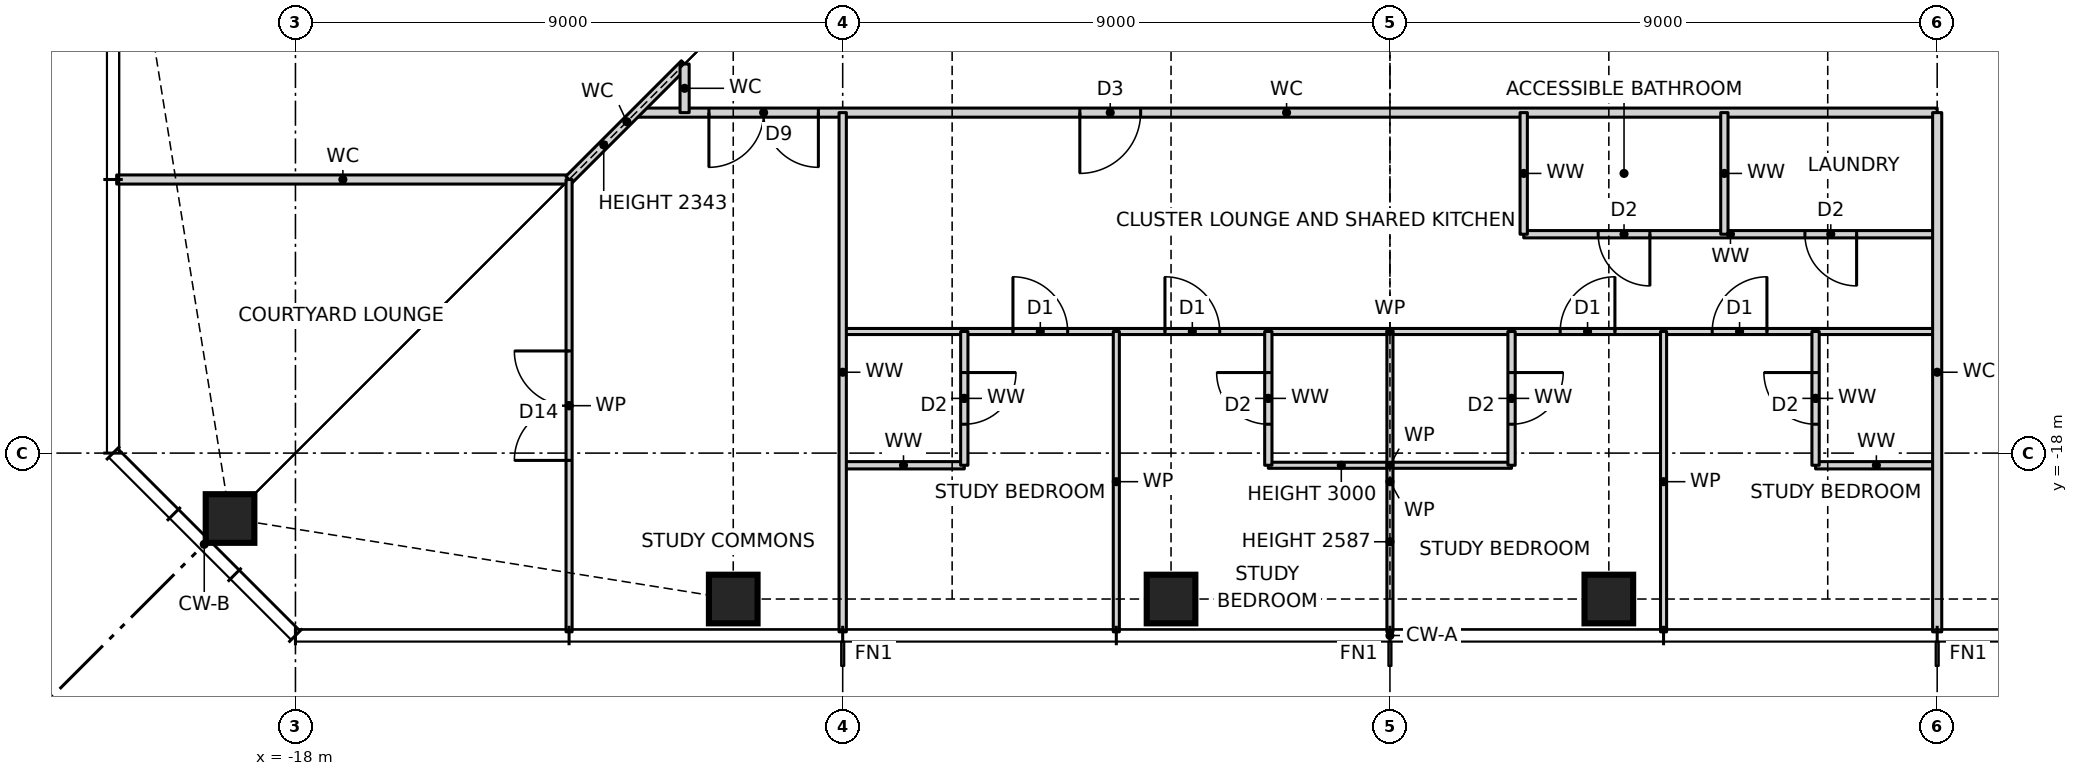
"""IFC4 building model, lengths in metres.
Left out: names, types, materials, properties, quantities, classifications, styles, units other than length and angle.
Written with IfcOpenShell. Run it as: python <this file> out.ifc"""

import sys

from ifc_helpers import new_model, si_unit, direction, frame, frame_2d, origin, origin_2d, place, context, subcontext, project, spatial, rectangle, hollow_rectangle, extrude, element, fill, save


model = new_model("IFC4")
c1 = context("Model", 3, precision=1e-05, world=origin(), true_north=direction((0.0, 1.0)))
c2 = subcontext(c1, "Body", "Model", "MODEL_VIEW")
j1 = project(units=[si_unit("LENGTHUNIT", "METRE"), si_unit("PLANEANGLEUNIT", "RADIAN")], contexts=[c1])
p1 = place(None, origin())
s1 = spatial("IfcSite", under=j1, at=p1, CompositionType="ELEMENT")
p2 = place(p1, origin())
s2 = spatial("IfcBuilding", under=s1, at=p2, CompositionType="ELEMENT")
p3 = place(p2, frame((0.0, 0.0, 87.5)))
s3 = spatial("IfcBuildingStorey", under=s2, at=p3, CompositionType="ELEMENT", Elevation=87.5)
for number, where, z_axis, x_axis in (
    (1, (-19.076, -19.076, 0.0), (0.0, 0.0, 1.0), (1.0, 0.0, 0.0)),
    (2, (-10.8, -20.4, 0.0), (0.0, 0.0, 1.0), (1.0, 0.0, 0.0)),
    (3, (-3.6, -20.4, 0.0), (0.0, 0.0, 1.0), (1.0, 0.0, 0.0)),
    (4, (3.6, -20.4, 0.0), (0.0, 0.0, 1.0), (1.0, 0.0, 0.0)),
):
    element("IfcColumn", number, at=place(p3, frame(where, z_axis=z_axis, x_axis=x_axis)), inside=s3, PredefinedType="COLUMN", context=c2, shape_type="SweptSolid", body=[
        extrude(hollow_rectangle(XDim=0.8, YDim=0.8, WallThickness=0.07, at=origin_2d()), origin(), (0.0, 0.0, 1.0), 3.5),
    ])
p4 = place(p3, frame((-9.0, -18.2, 0.0), z_axis=(0.0, 0.0, 1.0), x_axis=(1.0, 0.0, 0.0)))
e5 = element("IfcWall", 5, at=p4, inside=s3, PredefinedType="PARTITIONING", context=c2, shape_type="SweptSolid", body=[
    extrude(rectangle(XDim=2.0, YDim=0.12, at=frame_2d((1.0, 0.0))), origin(), (0.0, 0.0, 1.0), 3.27),
])
p5 = place(p3, frame((-2.0, -18.2, 0.0), z_axis=(0.0, 0.0, 1.0), x_axis=(1.0, 0.0, 0.0)))
e6 = element("IfcWall", 6, at=p5, inside=s3, PredefinedType="PARTITIONING", context=c2, shape_type="SweptSolid", body=[
    extrude(rectangle(XDim=4.0, YDim=0.1, at=frame_2d((2.0, 0.0))), origin(), (0.0, 0.0, 1.0), 3.0),
])
p6 = place(p3, frame((7.0, -18.2, 0.0), z_axis=(0.0, 0.0, 1.0), x_axis=(1.0, 0.0, 0.0)))
e7 = element("IfcWall", 7, at=p6, inside=s3, PredefinedType="PARTITIONING", context=c2, shape_type="SweptSolid", body=[
    extrude(rectangle(XDim=2.0, YDim=0.12, at=frame_2d((1.0, 0.0))), origin(), (0.0, 0.0, 1.0), 3.27),
])
p7 = place(p3, frame((-9.0, -16.0, 0.0), z_axis=(0.0, 0.0, 1.0), x_axis=(1.0, 0.0, 0.0)))
e8 = element("IfcWall", 8, at=p7, inside=s3, PredefinedType="PARTITIONING", context=c2, shape_type="SweptSolid", body=[
    extrude(rectangle(XDim=18.0, YDim=0.1, at=frame_2d((9.0, 0.0))), origin(), (0.0, 0.0, 1.0), 3.27),
])
p8 = place(p7, frame((2.8, 0.0, 0.0)))
e9 = element("IfcOpeningElement", 9, at=p8, cuts=e8, PredefinedType="OPENING", context=c2, shape_type="SweptSolid", body=[
    extrude(rectangle(XDim=0.9, YDim=2.1, at=frame_2d((0.45, 1.05))), frame((0.0, 0.06, 0.0), z_axis=(0.0, -1.0, 0.0), x_axis=(1.0, 0.0, 0.0)), (0.0, 0.0, 1.0), 0.12),
])
p9 = place(p7, frame((5.3, 0.0, 0.0)))
e10 = element("IfcOpeningElement", 10, at=p9, cuts=e8, PredefinedType="OPENING", context=c2, shape_type="SweptSolid", body=[
    extrude(rectangle(XDim=0.9, YDim=2.1, at=frame_2d((0.45, 1.05))), frame((0.0, 0.06, 0.0), z_axis=(0.0, -1.0, 0.0), x_axis=(1.0, 0.0, 0.0)), (0.0, 0.0, 1.0), 0.12),
])
p10 = place(p7, frame((11.8, 0.0, 0.0)))
e11 = element("IfcOpeningElement", 11, at=p10, cuts=e8, PredefinedType="OPENING", context=c2, shape_type="SweptSolid", body=[
    extrude(rectangle(XDim=0.9, YDim=2.1, at=frame_2d((0.45, 1.05))), frame((0.0, 0.06, 0.0), z_axis=(0.0, -1.0, 0.0), x_axis=(1.0, 0.0, 0.0)), (0.0, 0.0, 1.0), 0.12),
])
p11 = place(p7, frame((14.3, 0.0, 0.0)))
e12 = element("IfcOpeningElement", 12, at=p11, cuts=e8, PredefinedType="OPENING", context=c2, shape_type="SweptSolid", body=[
    extrude(rectangle(XDim=0.9, YDim=2.1, at=frame_2d((0.45, 1.05))), frame((0.0, 0.06, 0.0), z_axis=(0.0, -1.0, 0.0), x_axis=(1.0, 0.0, 0.0)), (0.0, 0.0, 1.0), 0.12),
])
p12 = place(p3, frame((2.2, -14.4, 0.0), z_axis=(0.0, 0.0, 1.0), x_axis=(1.0, 0.0, 0.0)))
e13 = element("IfcWall", 13, at=p12, inside=s3, PredefinedType="PARTITIONING", context=c2, shape_type="SweptSolid", body=[
    extrude(rectangle(XDim=6.8, YDim=0.12, at=frame_2d((3.4, 0.0))), origin(), (0.0, 0.0, 1.0), 3.27),
])
p13 = place(p12, frame((1.225, 0.0, 0.0)))
e14 = element("IfcOpeningElement", 14, at=p13, cuts=e13, PredefinedType="OPENING", context=c2, shape_type="SweptSolid", body=[
    extrude(rectangle(XDim=0.85, YDim=2.1, at=frame_2d((0.425, 1.05))), frame((0.0, 0.07, 0.0), z_axis=(0.0, -1.0, 0.0), x_axis=(1.0, 0.0, 0.0)), (0.0, 0.0, 1.0), 0.14),
])
p14 = place(p12, frame((4.625, 0.0, 0.0)))
e15 = element("IfcOpeningElement", 15, at=p14, cuts=e13, PredefinedType="OPENING", context=c2, shape_type="SweptSolid", body=[
    extrude(rectangle(XDim=0.85, YDim=2.1, at=frame_2d((0.425, 1.05))), frame((0.0, 0.07, 0.0), z_axis=(0.0, -1.0, 0.0), x_axis=(1.0, 0.0, 0.0)), (0.0, 0.0, 1.0), 0.14),
])
p15 = place(p3, frame((-20.94, -13.5, 0.0), z_axis=(0.0, 0.0, 1.0), x_axis=(1.0, 0.0, 0.0)))
e16 = element("IfcWall", 16, at=p15, inside=s3, PredefinedType="PARTITIONING", context=c2, shape_type="SweptSolid", body=[
    extrude(rectangle(XDim=7.44, YDim=0.15, at=frame_2d((3.72, 0.0))), origin(), (0.0, 0.0, 1.0), 3.27),
])
p16 = place(p3, frame((-12.4, -12.4, 0.0), z_axis=(0.0, 0.0, 1.0), x_axis=(1.0, 0.0, 0.0)))
e17 = element("IfcWall", 17, at=p16, inside=s3, PredefinedType="PARTITIONING", context=c2, shape_type="SweptSolid", body=[
    extrude(rectangle(XDim=21.4, YDim=0.15, at=frame_2d((10.7, 0.0))), origin(), (0.0, 0.0, 1.0), 3.27),
])
p17 = place(p16, frame((1.2, 0.0, 0.0)))
e18 = element("IfcOpeningElement", 18, at=p17, cuts=e17, PredefinedType="OPENING", context=c2, shape_type="SweptSolid", body=[
    extrude(rectangle(XDim=1.8, YDim=2.1, at=frame_2d((0.9, 1.05))), frame((0.0, 0.085, 0.0), z_axis=(0.0, -1.0, 0.0), x_axis=(1.0, 0.0, 0.0)), (0.0, 0.0, 1.0), 0.17),
])
p18 = place(p16, frame((7.3, 0.0, 0.0)))
e19 = element("IfcOpeningElement", 19, at=p18, cuts=e17, PredefinedType="OPENING", context=c2, shape_type="SweptSolid", body=[
    extrude(rectangle(XDim=1.0, YDim=2.1, at=frame_2d((0.5, 1.05))), frame((0.0, 0.085, 0.0), z_axis=(0.0, -1.0, 0.0), x_axis=(1.0, 0.0, 0.0)), (0.0, 0.0, 1.0), 0.17),
])
p19 = place(p3, frame((-13.5, -13.5, 0.0), z_axis=(0.0, 0.0, 1.0), x_axis=(0.707106781187, 0.707106781187, 0.0)))
e20 = element("IfcWall", 20, at=p19, inside=s3, PredefinedType="PARTITIONING", context=c2, shape_type="SweptSolid", body=[
    extrude(rectangle(XDim=2.687, YDim=0.15, at=frame_2d((1.343, 0.0))), origin(), (0.0, 0.0, 1.0), 2.343),
])
p20 = place(p3, frame((9.0, -20.94, 0.0), z_axis=(0.0, 0.0, 1.0), x_axis=(0.0, 1.0, 0.0)))
e21 = element("IfcWall", 21, at=p20, inside=s3, PredefinedType="PARTITIONING", context=c2, shape_type="SweptSolid", body=[
    extrude(rectangle(XDim=8.54, YDim=0.15, at=frame_2d((4.27, 0.0))), origin(), (0.0, 0.0, 1.0), 3.27),
])
p21 = place(p3, frame((7.0, -18.2, 0.0), z_axis=(0.0, 0.0, 1.0), x_axis=(0.0, 1.0, 0.0)))
e22 = element("IfcWall", 22, at=p21, inside=s3, PredefinedType="PARTITIONING", context=c2, shape_type="SweptSolid", body=[
    extrude(rectangle(XDim=2.2, YDim=0.12, at=frame_2d((1.1, 0.0))), origin(), (0.0, 0.0, 1.0), 3.27),
])
p22 = place(p21, frame((0.675, 0.0, 0.0)))
e23 = element("IfcOpeningElement", 23, at=p22, cuts=e22, PredefinedType="OPENING", context=c2, shape_type="SweptSolid", body=[
    extrude(rectangle(XDim=0.85, YDim=2.1, at=frame_2d((0.425, 1.05))), frame((0.0, 0.07, 0.0), z_axis=(0.0, -1.0, 0.0), x_axis=(1.0, 0.0, 0.0)), (0.0, 0.0, 1.0), 0.14),
])
p23 = place(p3, frame((5.5, -14.4, 0.0), z_axis=(0.0, 0.0, 1.0), x_axis=(0.0, 1.0, 0.0)))
e24 = element("IfcWall", 24, at=p23, inside=s3, PredefinedType="PARTITIONING", context=c2, shape_type="SweptSolid", body=[
    extrude(rectangle(XDim=2.0, YDim=0.12, at=frame_2d((1.0, 0.0))), origin(), (0.0, 0.0, 1.0), 3.27),
])
p24 = place(p3, frame((4.5, -20.94, 0.0), z_axis=(0.0, 0.0, 1.0), x_axis=(0.0, 1.0, 0.0)))
e25 = element("IfcWall", 25, at=p24, inside=s3, PredefinedType="PARTITIONING", context=c2, shape_type="SweptSolid", body=[
    extrude(rectangle(XDim=4.94, YDim=0.1, at=frame_2d((2.47, 0.0))), origin(), (0.0, 0.0, 1.0), 3.27),
])
p25 = place(p3, frame((2.2, -14.4, 0.0), z_axis=(0.0, 0.0, 1.0), x_axis=(0.0, 1.0, 0.0)))
e26 = element("IfcWall", 26, at=p25, inside=s3, PredefinedType="PARTITIONING", context=c2, shape_type="SweptSolid", body=[
    extrude(rectangle(XDim=2.0, YDim=0.12, at=frame_2d((1.0, 0.0))), origin(), (0.0, 0.0, 1.0), 3.27),
])
p26 = place(p3, frame((2.0, -18.2, 0.0), z_axis=(0.0, 0.0, 1.0), x_axis=(0.0, 1.0, 0.0)))
e27 = element("IfcWall", 27, at=p26, inside=s3, PredefinedType="PARTITIONING", context=c2, shape_type="SweptSolid", body=[
    extrude(rectangle(XDim=2.2, YDim=0.12, at=frame_2d((1.1, 0.0))), origin(), (0.0, 0.0, 1.0), 3.27),
])
p27 = place(p26, frame((0.675, 0.0, 0.0)))
e28 = element("IfcOpeningElement", 28, at=p27, cuts=e27, PredefinedType="OPENING", context=c2, shape_type="SweptSolid", body=[
    extrude(rectangle(XDim=0.85, YDim=2.1, at=frame_2d((0.425, 1.05))), frame((0.0, 0.07, 0.0), z_axis=(0.0, -1.0, 0.0), x_axis=(1.0, 0.0, 0.0)), (0.0, 0.0, 1.0), 0.14),
])
p28 = place(p3, frame((0.0, -20.94, 0.0), z_axis=(0.0, 0.0, 1.0), x_axis=(0.0, 1.0, 0.0)))
e29 = element("IfcWall", 29, at=p28, inside=s3, PredefinedType="PARTITIONING", context=c2, shape_type="SweptSolid", body=[
    extrude(rectangle(XDim=4.94, YDim=0.1, at=frame_2d((2.47, 0.0))), origin(), (0.0, 0.0, 1.0), 2.587),
])
p29 = place(p3, frame((-2.0, -18.2, 0.0), z_axis=(0.0, 0.0, 1.0), x_axis=(0.0, 1.0, 0.0)))
e30 = element("IfcWall", 30, at=p29, inside=s3, PredefinedType="PARTITIONING", context=c2, shape_type="SweptSolid", body=[
    extrude(rectangle(XDim=2.2, YDim=0.12, at=frame_2d((1.1, 0.0))), origin(), (0.0, 0.0, 1.0), 3.27),
])
p30 = place(p29, frame((0.675, 0.0, 0.0)))
e31 = element("IfcOpeningElement", 31, at=p30, cuts=e30, PredefinedType="OPENING", context=c2, shape_type="SweptSolid", body=[
    extrude(rectangle(XDim=0.85, YDim=2.1, at=frame_2d((0.425, 1.05))), frame((0.0, 0.07, 0.0), z_axis=(0.0, -1.0, 0.0), x_axis=(1.0, 0.0, 0.0)), (0.0, 0.0, 1.0), 0.14),
])
p31 = place(p3, frame((-4.5, -20.94, 0.0), z_axis=(0.0, 0.0, 1.0), x_axis=(0.0, 1.0, 0.0)))
e32 = element("IfcWall", 32, at=p31, inside=s3, PredefinedType="PARTITIONING", context=c2, shape_type="SweptSolid", body=[
    extrude(rectangle(XDim=4.94, YDim=0.1, at=frame_2d((2.47, 0.0))), origin(), (0.0, 0.0, 1.0), 3.27),
])
p32 = place(p3, frame((-7.0, -18.2, 0.0), z_axis=(0.0, 0.0, 1.0), x_axis=(0.0, 1.0, 0.0)))
e33 = element("IfcWall", 33, at=p32, inside=s3, PredefinedType="PARTITIONING", context=c2, shape_type="SweptSolid", body=[
    extrude(rectangle(XDim=2.2, YDim=0.12, at=frame_2d((1.1, 0.0))), origin(), (0.0, 0.0, 1.0), 3.27),
])
p33 = place(p32, frame((0.675, 0.0, 0.0)))
e34 = element("IfcOpeningElement", 34, at=p33, cuts=e33, PredefinedType="OPENING", context=c2, shape_type="SweptSolid", body=[
    extrude(rectangle(XDim=0.85, YDim=2.1, at=frame_2d((0.425, 1.05))), frame((0.0, 0.07, 0.0), z_axis=(0.0, -1.0, 0.0), x_axis=(1.0, 0.0, 0.0)), (0.0, 0.0, 1.0), 0.14),
])
p34 = place(p3, frame((-9.0, -20.94, 0.0), z_axis=(0.0, 0.0, 1.0), x_axis=(0.0, 1.0, 0.0)))
e35 = element("IfcWall", 35, at=p34, inside=s3, PredefinedType="PARTITIONING", context=c2, shape_type="SweptSolid", body=[
    extrude(rectangle(XDim=8.54, YDim=0.12, at=frame_2d((4.27, 0.0))), origin(), (0.0, 0.0, 1.0), 3.27),
])
p35 = place(p3, frame((-11.6, -12.4, 0.0), z_axis=(0.0, 0.0, 1.0), x_axis=(0.0, 1.0, 0.0)))
e36 = element("IfcWall", 36, at=p35, inside=s3, PredefinedType="PARTITIONING", context=c2, shape_type="SweptSolid", body=[
    extrude(rectangle(XDim=0.8, YDim=0.15, at=frame_2d((0.4, 0.0))), origin(), (0.0, 0.0, 1.0), 3.27),
])
p36 = place(p3, frame((-13.5, -20.94, 0.0), z_axis=(0.0, 0.0, 1.0), x_axis=(0.0, 1.0, 0.0)))
e37 = element("IfcWall", 37, at=p36, inside=s3, PredefinedType="PARTITIONING", context=c2, shape_type="SweptSolid", body=[
    extrude(rectangle(XDim=7.44, YDim=0.1, at=frame_2d((3.72, 0.0))), origin(), (0.0, 0.0, 1.0), 3.27),
])
p37 = place(p36, frame((2.82, 0.0, 0.0)))
e38 = element("IfcOpeningElement", 38, at=p37, cuts=e37, PredefinedType="OPENING", context=c2, shape_type="SweptSolid", body=[
    extrude(rectangle(XDim=1.8, YDim=2.1, at=frame_2d((0.9, 1.05))), frame((0.0, 0.06, 0.0), z_axis=(0.0, -1.0, 0.0), x_axis=(1.0, 0.0, 0.0)), (0.0, 0.0, 1.0), 0.12),
])
p38 = place(p17, frame((1.8, 0.0, 0.0), z_axis=(0.0, 0.0, 1.0), x_axis=(-1.0, 0.0, 0.0)))
e39 = element("IfcDoor", 39, at=p38, inside=s3, OperationType="DOUBLE_DOOR_SINGLE_SWING", PredefinedType="DOOR", context=c2, shape_type="SweptSolid", body=[
    extrude(rectangle(XDim=1.8, YDim=2.1, at=frame_2d((0.9, 1.05))), frame((0.0, 0.025, 0.0), z_axis=(0.0, -1.0, 0.0), x_axis=(1.0, 0.0, 0.0)), (0.0, 0.0, 1.0), 0.05),
])
fill(e18, e39)
p39 = place(p33, frame((0.85, 0.0, 0.0), z_axis=(0.0, 0.0, 1.0), x_axis=(-1.0, 0.0, 0.0)))
e40 = element("IfcDoor", 40, at=p39, inside=s3, OperationType="SINGLE_SWING_LEFT", PredefinedType="DOOR", context=c2, shape_type="SweptSolid", body=[
    extrude(rectangle(XDim=0.85, YDim=2.1, at=frame_2d((0.425, 1.05))), frame((0.0, 0.025, 0.0), z_axis=(0.0, -1.0, 0.0), x_axis=(1.0, 0.0, 0.0)), (0.0, 0.0, 1.0), 0.05),
])
fill(e34, e40)
p40 = place(p8, origin())
e41 = element("IfcDoor", 41, at=p40, inside=s3, OperationType="SINGLE_SWING_LEFT", PredefinedType="DOOR", context=c2, shape_type="SweptSolid", body=[
    extrude(rectangle(XDim=0.9, YDim=2.1, at=frame_2d((0.45, 1.05))), frame((0.0, 0.025, 0.0), z_axis=(0.0, -1.0, 0.0), x_axis=(1.0, 0.0, 0.0)), (0.0, 0.0, 1.0), 0.05),
])
fill(e9, e41)
p41 = place(p30, origin())
e42 = element("IfcDoor", 42, at=p41, inside=s3, OperationType="SINGLE_SWING_RIGHT", PredefinedType="DOOR", context=c2, shape_type="SweptSolid", body=[
    extrude(rectangle(XDim=0.85, YDim=2.1, at=frame_2d((0.425, 1.05))), frame((0.0, 0.025, 0.0), z_axis=(0.0, -1.0, 0.0), x_axis=(1.0, 0.0, 0.0)), (0.0, 0.0, 1.0), 0.05),
])
fill(e31, e42)
p42 = place(p9, origin())
e43 = element("IfcDoor", 43, at=p42, inside=s3, OperationType="SINGLE_SWING_LEFT", PredefinedType="DOOR", context=c2, shape_type="SweptSolid", body=[
    extrude(rectangle(XDim=0.9, YDim=2.1, at=frame_2d((0.45, 1.05))), frame((0.0, 0.025, 0.0), z_axis=(0.0, -1.0, 0.0), x_axis=(1.0, 0.0, 0.0)), (0.0, 0.0, 1.0), 0.05),
])
fill(e10, e43)
p43 = place(p27, frame((0.85, 0.0, 0.0), z_axis=(0.0, 0.0, 1.0), x_axis=(-1.0, 0.0, 0.0)))
e44 = element("IfcDoor", 44, at=p43, inside=s3, OperationType="SINGLE_SWING_LEFT", PredefinedType="DOOR", context=c2, shape_type="SweptSolid", body=[
    extrude(rectangle(XDim=0.85, YDim=2.1, at=frame_2d((0.425, 1.05))), frame((0.0, 0.025, 0.0), z_axis=(0.0, -1.0, 0.0), x_axis=(1.0, 0.0, 0.0)), (0.0, 0.0, 1.0), 0.05),
])
fill(e28, e44)
p44 = place(p10, origin())
e45 = element("IfcDoor", 45, at=p44, inside=s3, OperationType="SINGLE_SWING_RIGHT", PredefinedType="DOOR", context=c2, shape_type="SweptSolid", body=[
    extrude(rectangle(XDim=0.9, YDim=2.1, at=frame_2d((0.45, 1.05))), frame((0.0, 0.025, 0.0), z_axis=(0.0, -1.0, 0.0), x_axis=(1.0, 0.0, 0.0)), (0.0, 0.0, 1.0), 0.05),
])
fill(e11, e45)
p45 = place(p22, origin())
e46 = element("IfcDoor", 46, at=p45, inside=s3, OperationType="SINGLE_SWING_RIGHT", PredefinedType="DOOR", context=c2, shape_type="SweptSolid", body=[
    extrude(rectangle(XDim=0.85, YDim=2.1, at=frame_2d((0.425, 1.05))), frame((0.0, 0.025, 0.0), z_axis=(0.0, -1.0, 0.0), x_axis=(1.0, 0.0, 0.0)), (0.0, 0.0, 1.0), 0.05),
])
fill(e23, e46)
p46 = place(p11, origin())
e47 = element("IfcDoor", 47, at=p46, inside=s3, OperationType="SINGLE_SWING_RIGHT", PredefinedType="DOOR", context=c2, shape_type="SweptSolid", body=[
    extrude(rectangle(XDim=0.9, YDim=2.1, at=frame_2d((0.45, 1.05))), frame((0.0, 0.025, 0.0), z_axis=(0.0, -1.0, 0.0), x_axis=(1.0, 0.0, 0.0)), (0.0, 0.0, 1.0), 0.05),
])
fill(e12, e47)
p47 = place(p18, frame((1.0, 0.0, 0.0), z_axis=(0.0, 0.0, 1.0), x_axis=(-1.0, 0.0, 0.0)))
e48 = element("IfcDoor", 48, at=p47, inside=s3, OperationType="SINGLE_SWING_RIGHT", PredefinedType="DOOR", context=c2, shape_type="SweptSolid", body=[
    extrude(rectangle(XDim=1.0, YDim=2.1, at=frame_2d((0.5, 1.05))), frame((0.0, 0.025, 0.0), z_axis=(0.0, -1.0, 0.0), x_axis=(1.0, 0.0, 0.0)), (0.0, 0.0, 1.0), 0.05),
])
fill(e19, e48)
p48 = place(p13, frame((0.85, 0.0, 0.0), z_axis=(0.0, 0.0, 1.0), x_axis=(-1.0, 0.0, 0.0)))
e49 = element("IfcDoor", 49, at=p48, inside=s3, OperationType="SINGLE_SWING_LEFT", PredefinedType="DOOR", context=c2, shape_type="SweptSolid", body=[
    extrude(rectangle(XDim=0.85, YDim=2.1, at=frame_2d((0.425, 1.05))), frame((0.0, 0.025, 0.0), z_axis=(0.0, -1.0, 0.0), x_axis=(1.0, 0.0, 0.0)), (0.0, 0.0, 1.0), 0.05),
])
fill(e14, e49)
p49 = place(p14, frame((0.85, 0.0, 0.0), z_axis=(0.0, 0.0, 1.0), x_axis=(-1.0, 0.0, 0.0)))
e50 = element("IfcDoor", 50, at=p49, inside=s3, OperationType="SINGLE_SWING_LEFT", PredefinedType="DOOR", context=c2, shape_type="SweptSolid", body=[
    extrude(rectangle(XDim=0.85, YDim=2.1, at=frame_2d((0.425, 1.05))), frame((0.0, 0.025, 0.0), z_axis=(0.0, -1.0, 0.0), x_axis=(1.0, 0.0, 0.0)), (0.0, 0.0, 1.0), 0.05),
])
fill(e15, e50)
p50 = place(p37, origin())
e51 = element("IfcDoor", 51, at=p50, inside=s3, OperationType="DOUBLE_DOOR_SINGLE_SWING", PredefinedType="DOOR", context=c2, shape_type="SweptSolid", body=[
    extrude(rectangle(XDim=1.8, YDim=2.1, at=frame_2d((0.9, 1.05))), frame((0.0, 0.025, 0.0), z_axis=(0.0, -1.0, 0.0), x_axis=(1.0, 0.0, 0.0)), (0.0, 0.0, 1.0), 0.05),
])
fill(e38, e51)
save(model, sys.argv[1])
